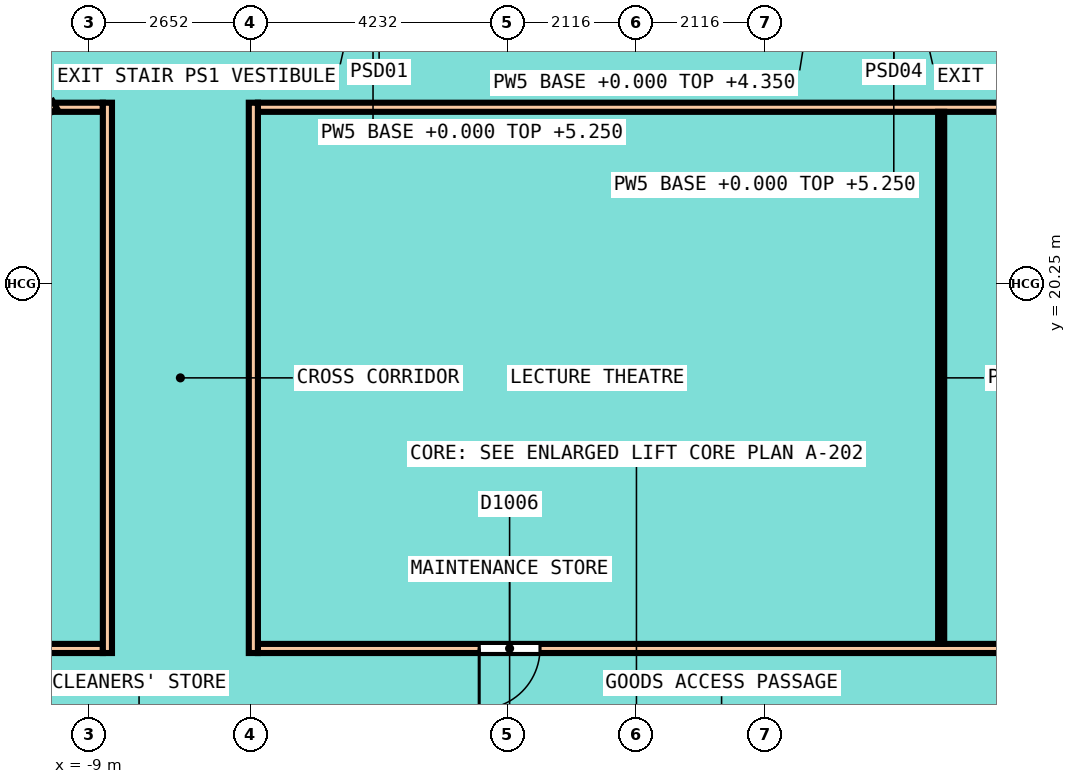
"""IFC4 building model, lengths in metres.
Left out: names, types, materials, properties, quantities, classifications, styles, units other than length and angle.
Written with IfcOpenShell. Run it as: python <this file> out.ifc"""

import sys

from ifc_helpers import new_model, si_unit, direction, frame, frame_2d, origin, place, context, subcontext, project, spatial, rectangle, extrude, element, fill, save


model = new_model("IFC4")
c1 = context("Model", 3, precision=1e-05, world=origin(), true_north=direction((0.0, 1.0)))
c2 = subcontext(c1, "Body", "Model", "MODEL_VIEW")
j1 = project(units=[si_unit("LENGTHUNIT", "METRE"), si_unit("PLANEANGLEUNIT", "RADIAN")], contexts=[c1])
p1 = place(None, origin())
s1 = spatial("IfcSite", under=j1, at=p1, CompositionType="ELEMENT")
p2 = place(p1, origin())
s2 = spatial("IfcBuilding", under=s1, at=p2, CompositionType="ELEMENT")
p3 = place(p2, origin())
s3 = spatial("IfcBuildingStorey", under=s2, at=p3, CompositionType="ELEMENT", Elevation=0.0)
p4 = place(p3, frame((-16.575, 14.25, 0.0), z_axis=(0.0, 0.0, 1.0), x_axis=(1.0, 0.0, 0.0)))
e1 = element("IfcWall", 1, at=p4, inside=s3, PredefinedType="PARTITIONING", context=c2, shape_type="SweptSolid", body=[
    extrude(rectangle(XDim=7.8, YDim=0.15, at=frame_2d((3.9, 0.0))), origin(), (0.0, 0.0, 1.0), 4.2),
])
p5 = place(p3, frame((-6.225, 14.25, 0.0), z_axis=(0.0, 0.0, 1.0), x_axis=(1.0, 0.0, 0.0)))
e2 = element("IfcWall", 2, at=p5, inside=s3, PredefinedType="PARTITIONING", context=c2, shape_type="SweptSolid", body=[
    extrude(rectangle(XDim=22.95, YDim=0.15, at=frame_2d((11.475, 0.0))), origin(), (0.0, 0.0, 1.0), 4.2),
])
p6 = place(p5, frame((14.995, 0.0, 0.0)))
e3 = element("IfcOpeningElement", 3, at=p6, cuts=e2, PredefinedType="OPENING", context=c2, shape_type="SweptSolid", body=[
    extrude(rectangle(XDim=1.2, YDim=2.1, at=frame_2d((0.6, 1.05))), frame((0.0, 0.085, 0.0), z_axis=(0.0, -1.0, 0.0), x_axis=(1.0, 0.0, 0.0)), (0.0, 0.0, 1.0), 0.17),
])
p7 = place(p5, frame((3.639, 0.0, 0.0)))
e4 = element("IfcOpeningElement", 4, at=p7, cuts=e2, PredefinedType="OPENING", context=c2, shape_type="SweptSolid", body=[
    extrude(rectangle(XDim=1.0, YDim=2.1, at=frame_2d((0.5, 1.05))), frame((0.0, 0.085, 0.0), z_axis=(0.0, -1.0, 0.0), x_axis=(1.0, 0.0, 0.0)), (0.0, 0.0, 1.0), 0.17),
])
p8 = place(p3, frame((-9.554, 23.15, 0.0), z_axis=(0.0, 0.0, 1.0), x_axis=(1.0, 0.0, 0.0)))
e5 = element("IfcWall", 5, at=p8, inside=s3, PredefinedType="PARTITIONING", context=c2, shape_type="SweptSolid", body=[
    extrude(rectangle(XDim=0.779, YDim=0.15, at=frame_2d((0.389, 0.0))), origin(), (0.0, 0.0, 1.0), 4.2),
])
p9 = place(p3, frame((-6.225, 23.15, 0.0), z_axis=(0.0, 0.0, 1.0), x_axis=(1.0, 0.0, 0.0)))
e6 = element("IfcWall", 6, at=p9, inside=s3, PredefinedType="PARTITIONING", context=c2, shape_type="SweptSolid", body=[
    extrude(rectangle(XDim=15.929, YDim=0.15, at=frame_2d((7.964, 0.0))), origin(), (0.0, 0.0, 1.0), 4.2),
])
p10 = place(p3, frame((-15.169, 19.951, 0.0), z_axis=(0.0, 0.0, 1.0), x_axis=(0.866024786089, 0.500001069878, 0.0)))
e7 = element("IfcWall", 7, at=p10, inside=s3, PredefinedType="PARTITIONING", context=c2, shape_type="SweptSolid", body=[
    extrude(rectangle(XDim=6.473, YDim=0.15, at=frame_2d((3.236, 0.0))), origin(), (0.0, 0.0, 1.0), 4.2),
])
for number, where, z_axis, x_axis in (
    (8, (-6.3, 14.175, 0.0), (0.0, 0.0, 1.0), (0.0, 1.0, 0.0)),
    (9, (-8.7, 14.175, 0.0), (0.0, 0.0, 1.0), (0.0, 1.0, 0.0)),
):
    element("IfcWall", number, at=place(p3, frame(where, z_axis=z_axis, x_axis=x_axis)), inside=s3, PredefinedType="PARTITIONING", context=c2, shape_type="SweptSolid", body=[
        extrude(rectangle(XDim=9.05, YDim=0.15, at=frame_2d((4.525, 0.0))), origin(), (0.0, 0.0, 1.0), 4.2),
    ])
p11 = place(p3, frame((5.011, 14.325, 0.0), z_axis=(0.0, 0.0, 1.0), x_axis=(0.0, 1.0, 0.0)))
e10 = element("IfcWall", 10, at=p11, inside=s3, PredefinedType="PARTITIONING", context=c2, shape_type="SweptSolid", body=[
    extrude(rectangle(XDim=8.75, YDim=0.1, at=frame_2d((4.375, 0.0))), origin(), (0.0, 0.0, 1.0), 4.2),
])
p12 = place(p7, origin())
e11 = element("IfcDoor", 11, at=p12, inside=s3, OperationType="SINGLE_SWING_RIGHT", PredefinedType="DOOR", context=c2, shape_type="SweptSolid", body=[
    extrude(rectangle(XDim=1.0, YDim=2.1, at=frame_2d((0.5, 1.05))), frame((0.0, 0.025, 0.0), z_axis=(0.0, -1.0, 0.0), x_axis=(1.0, 0.0, 0.0)), (0.0, 0.0, 1.0), 0.05),
])
fill(e4, e11)
save(model, sys.argv[1])
